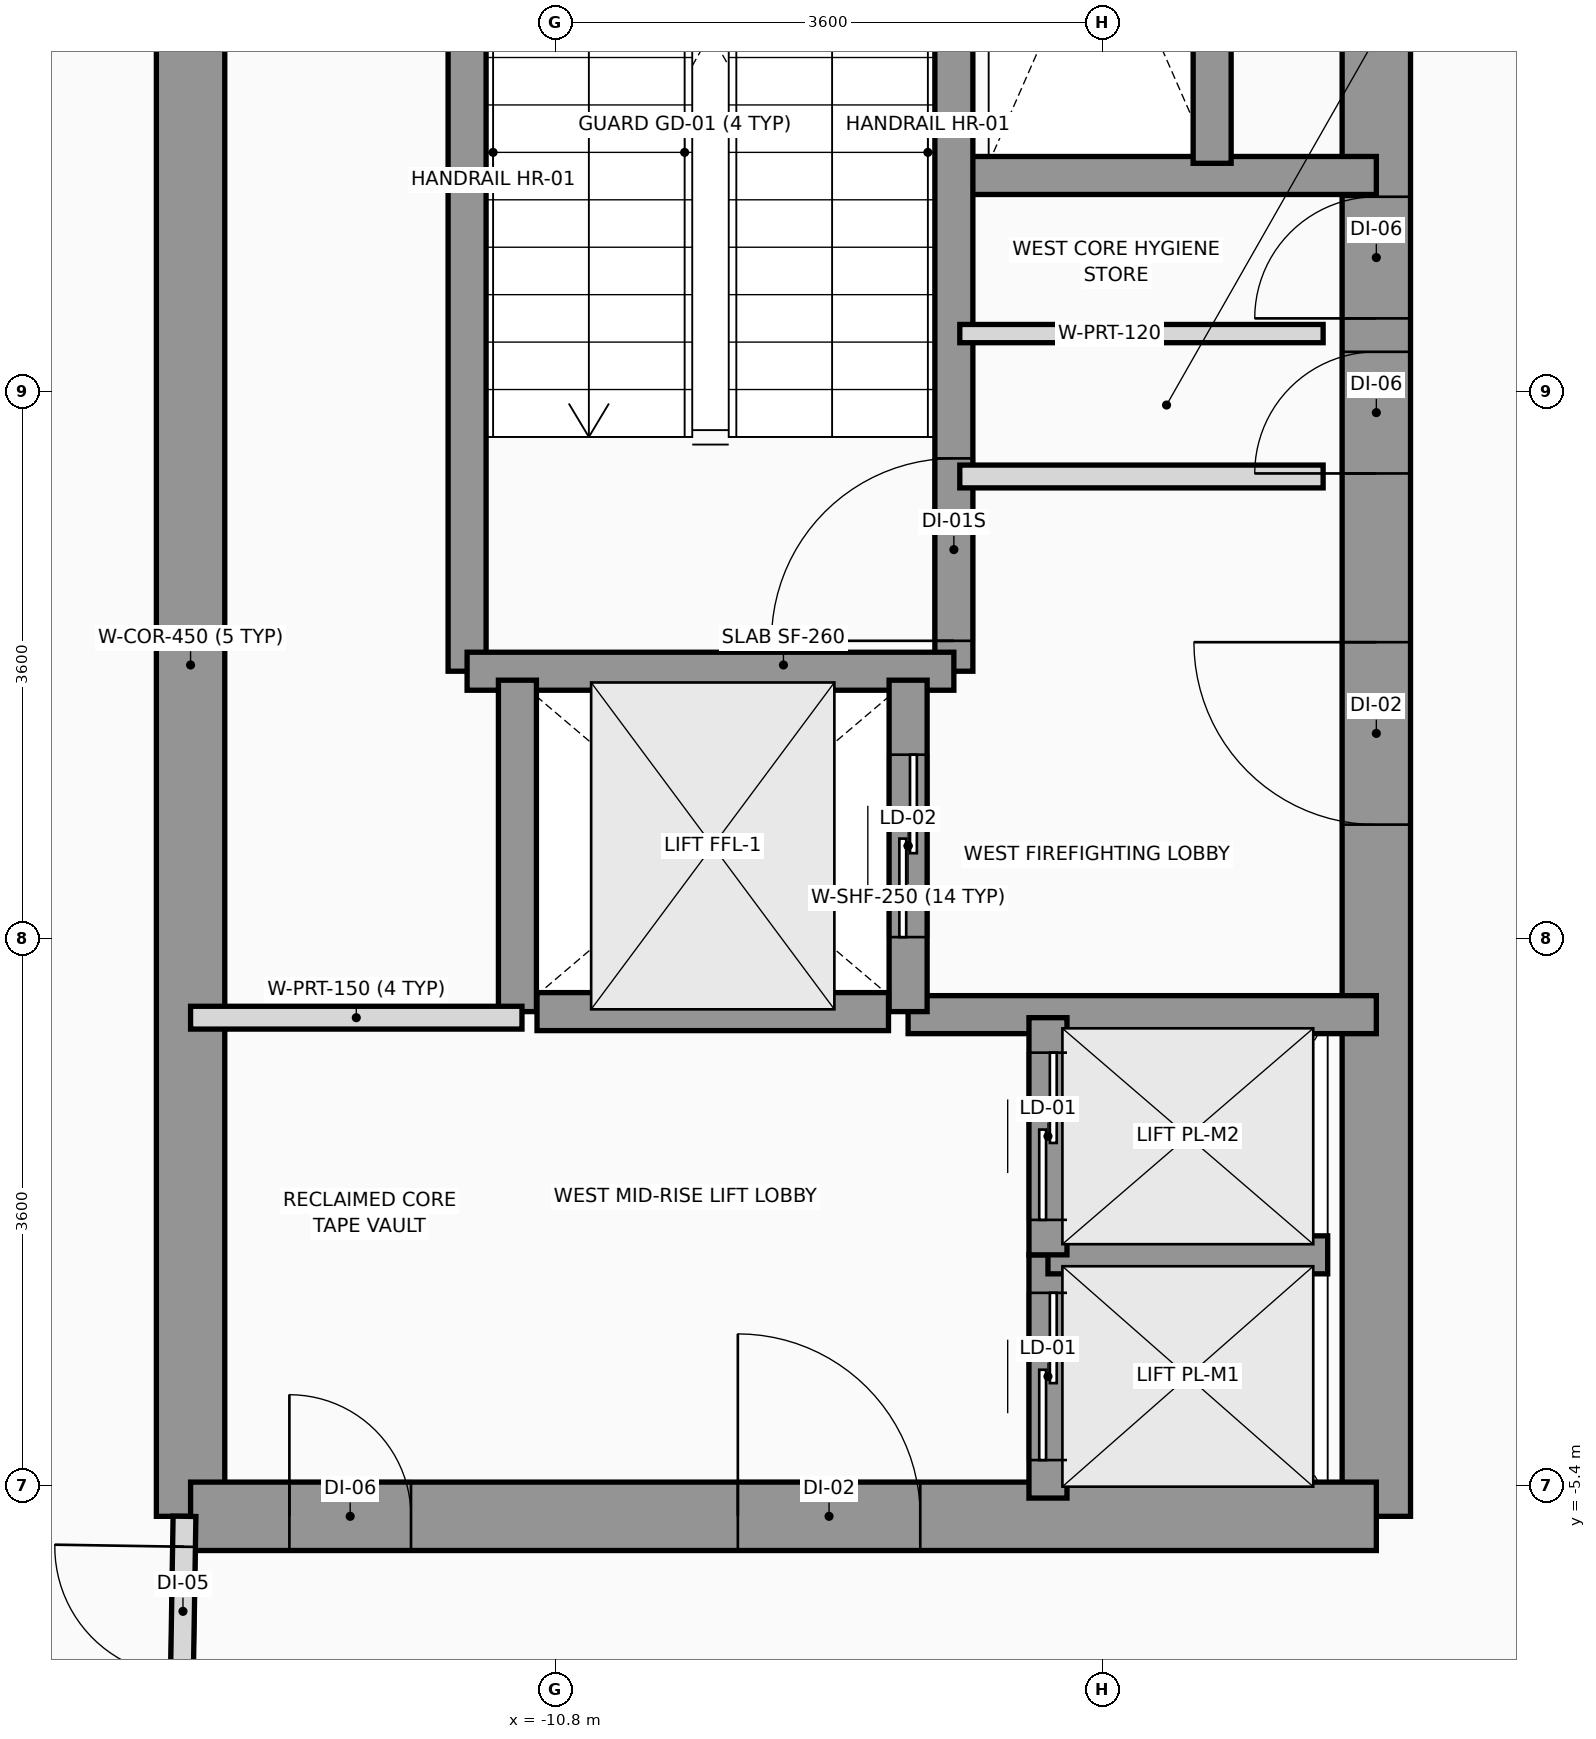
"""IFC4 building model, lengths in metres.
Left out: names, types, materials, properties, quantities, classifications, styles, units other than length and angle.
Written with IfcOpenShell. Run it as: python <this file> out.ifc"""

import sys

from ifc_helpers import new_model, si_unit, direction, frame, frame_2d, origin, place, context, subcontext, project, spatial, rectangle, extrude, source, transform, mapped, element, fill, save


model = new_model("IFC4")
c1 = context("Model", 3, precision=1e-05, world=origin(), true_north=direction((0.0, 1.0)))
c2 = subcontext(c1, "Body", "Model", "MODEL_VIEW")
j1 = project(units=[si_unit("LENGTHUNIT", "METRE"), si_unit("PLANEANGLEUNIT", "RADIAN")], contexts=[c1])
p1 = place(None, origin())
s1 = spatial("IfcSite", under=j1, at=p1, CompositionType="ELEMENT")
p2 = place(p1, origin())
s2 = spatial("IfcBuilding", under=s1, at=p2, CompositionType="ELEMENT")
p3 = place(p2, frame((0.0, 0.0, 151.6)))
s3 = spatial("IfcBuildingStorey", under=s2, at=p3, CompositionType="ELEMENT", Elevation=151.6)
p4 = place(p3, frame((-13.2, -5.6, 0.0), z_axis=(0.0, 0.0, 1.0), x_axis=(0.0, 1.0, 0.0)))
e1 = element("IfcWall", 1, at=p4, inside=s3, PredefinedType="SHEAR", context=c2, shape_type="SweptSolid", body=[
    extrude(rectangle(XDim=11.2, YDim=0.45, at=frame_2d((5.6, 0.0))), origin(), (0.0, 0.0, 1.0), 4.4),
])
p5 = place(p3, frame((-5.4, -5.6, 0.0), z_axis=(0.0, 0.0, 1.0), x_axis=(0.0, 1.0, 0.0)))
e2 = element("IfcWall", 2, at=p5, inside=s3, PredefinedType="SHEAR", context=c2, shape_type="SweptSolid", body=[
    extrude(rectangle(XDim=12.5, YDim=0.45, at=frame_2d((6.25, 0.0))), origin(), (0.0, 0.0, 1.0), 4.4),
])
p6 = place(p5, frame((4.55, 0.0, 0.0)))
e3 = element("IfcOpeningElement", 3, at=p6, cuts=e2, PredefinedType="OPENING", context=c2, shape_type="SweptSolid", body=[
    extrude(rectangle(XDim=1.2, YDim=2.2, at=frame_2d((0.6, 1.1))), frame((0.0, 0.235, 0.0), z_axis=(0.0, -1.0, 0.0), x_axis=(1.0, 0.0, 0.0)), (0.0, 0.0, 1.0), 0.47),
])
p7 = place(p5, frame((6.86, 0.0, 0.0)))
e4 = element("IfcOpeningElement", 4, at=p7, cuts=e2, PredefinedType="OPENING", context=c2, shape_type="SweptSolid", body=[
    extrude(rectangle(XDim=0.8, YDim=2.1, at=frame_2d((0.4, 1.05))), frame((0.0, 0.235, 0.0), z_axis=(0.0, -1.0, 0.0), x_axis=(1.0, 0.0, 0.0)), (0.0, 0.0, 1.0), 0.47),
])
p8 = place(p5, frame((7.88, 0.0, 0.0)))
e5 = element("IfcOpeningElement", 5, at=p8, cuts=e2, PredefinedType="OPENING", context=c2, shape_type="SweptSolid", body=[
    extrude(rectangle(XDim=0.8, YDim=2.1, at=frame_2d((0.4, 1.05))), frame((0.0, 0.235, 0.0), z_axis=(0.0, -1.0, 0.0), x_axis=(1.0, 0.0, 0.0)), (0.0, 0.0, 1.0), 0.47),
])
p9 = place(p3, frame((-13.2, -5.6, 0.0), z_axis=(0.0, 0.0, 1.0), x_axis=(1.0, 0.0, 0.0)))
e6 = element("IfcWall", 6, at=p9, inside=s3, PredefinedType="SHEAR", context=c2, shape_type="SweptSolid", body=[
    extrude(rectangle(XDim=7.8, YDim=0.45, at=frame_2d((3.9, 0.0))), origin(), (0.0, 0.0, 1.0), 4.4),
])
p10 = place(p9, frame((3.6, 0.0, 0.0)))
e7 = element("IfcOpeningElement", 7, at=p10, cuts=e6, PredefinedType="OPENING", context=c2, shape_type="SweptSolid", body=[
    extrude(rectangle(XDim=1.2, YDim=2.2, at=frame_2d((0.6, 1.1))), frame((0.0, 0.235, 0.0), z_axis=(0.0, -1.0, 0.0), x_axis=(1.0, 0.0, 0.0)), (0.0, 0.0, 1.0), 0.47),
])
p11 = place(p9, frame((0.65, 0.0, 0.0)))
e8 = element("IfcOpeningElement", 8, at=p11, cuts=e6, PredefinedType="OPENING", context=c2, shape_type="SweptSolid", body=[
    extrude(rectangle(XDim=0.8, YDim=2.1, at=frame_2d((0.4, 1.05))), frame((0.0, 0.235, 0.0), z_axis=(0.0, -1.0, 0.0), x_axis=(1.0, 0.0, 0.0)), (0.0, 0.0, 1.0), 0.47),
])
p12 = place(p3, frame((-8.18, 3.22, 0.0), z_axis=(0.0, 0.0, 1.0), x_axis=(1.0, 0.0, 0.0)))
e9 = element("IfcWall", 9, at=p12, inside=s3, PredefinedType="SOLIDWALL", context=c2, shape_type="SweptSolid", body=[
    extrude(rectangle(XDim=2.78, YDim=0.25, at=frame_2d((1.39, 0.0))), origin(), (0.0, 0.0, 1.0), 4.4),
])
p13 = place(p3, frame((-8.48, -2.3, 0.0), z_axis=(0.0, 0.0, 1.0), x_axis=(1.0, 0.0, 0.0)))
e10 = element("IfcWall", 10, at=p13, inside=s3, PredefinedType="SOLIDWALL", context=c2, shape_type="SweptSolid", body=[
    extrude(rectangle(XDim=3.08, YDim=0.25, at=frame_2d((1.54, 0.0))), origin(), (0.0, 0.0, 1.0), 4.4),
])
p14 = place(p3, frame((-8.179, -0.041, 0.0), z_axis=(0.0, 0.0, 1.0), x_axis=(0.0, 1.0, 0.0)))
e11 = element("IfcWall", 11, at=p14, inside=s3, PredefinedType="SOLIDWALL", context=c2, shape_type="SweptSolid", body=[
    extrude(rectangle(XDim=6.941, YDim=0.25, at=frame_2d((3.47, 0.0))), origin(), (0.0, 0.0, 1.0), 4.4),
])
p15 = place(p14, frame((0.2, 0.0, 0.0)))
e12 = element("IfcOpeningElement", 12, at=p15, cuts=e11, PredefinedType="OPENING", context=c2, shape_type="SweptSolid", body=[
    extrude(rectangle(XDim=1.2, YDim=2.2, at=frame_2d((0.6, 1.1))), frame((0.0, 0.135, 0.0), z_axis=(0.0, -1.0, 0.0), x_axis=(1.0, 0.0, 0.0)), (0.0, 0.0, 1.0), 0.27),
])
p16 = place(p3, frame((-11.381, -0.041, 0.0), z_axis=(0.0, 0.0, 1.0), x_axis=(0.0, 1.0, 0.0)))
e13 = element("IfcWall", 13, at=p16, inside=s3, PredefinedType="SOLIDWALL", context=c2, shape_type="SweptSolid", body=[
    extrude(rectangle(XDim=6.941, YDim=0.25, at=frame_2d((3.47, 0.0))), origin(), (0.0, 0.0, 1.0), 4.4),
])
p17 = place(p3, frame((-11.381, -0.041, 0.0), z_axis=(0.0, 0.0, 1.0), x_axis=(1.0, 0.0, 0.0)))
e14 = element("IfcWall", 14, at=p17, inside=s3, PredefinedType="SOLIDWALL", context=c2, shape_type="SweptSolid", body=[
    extrude(rectangle(XDim=3.202, YDim=0.25, at=frame_2d((1.601, 0.0))), origin(), (0.0, 0.0, 1.0), 4.4),
])
p18 = place(p3, frame((-11.05, -2.28, 0.0), z_axis=(0.0, 0.0, 1.0), x_axis=(0.0, 1.0, 0.0)))
e15 = element("IfcWall", 15, at=p18, inside=s3, PredefinedType="SOLIDWALL", context=c2, shape_type="SweptSolid", body=[
    extrude(rectangle(XDim=2.18, YDim=0.25, at=frame_2d((1.09, 0.0))), origin(), (0.0, 0.0, 1.0), 4.4),
])
p19 = place(p3, frame((-8.48, -2.28, 0.0), z_axis=(0.0, 0.0, 1.0), x_axis=(0.0, 1.0, 0.0)))
e16 = element("IfcWall", 16, at=p19, inside=s3, PredefinedType="SOLIDWALL", context=c2, shape_type="SweptSolid", body=[
    extrude(rectangle(XDim=2.18, YDim=0.25, at=frame_2d((1.09, 0.0))), origin(), (0.0, 0.0, 1.0), 4.4),
])
p20 = place(p19, frame((0.49, 0.0, 0.0)))
e17 = element("IfcOpeningElement", 17, at=p20, cuts=e16, PredefinedType="OPENING", context=c2, shape_type="SweptSolid", body=[
    extrude(rectangle(XDim=1.2, YDim=2.2, at=frame_2d((0.6, 1.1))), frame((0.0, 0.135, 0.0), z_axis=(0.0, -1.0, 0.0), x_axis=(1.0, 0.0, 0.0)), (0.0, 0.0, 1.0), 0.27),
])
p21 = place(p3, frame((-10.921, -2.28, 0.0), z_axis=(0.0, 0.0, 1.0), x_axis=(1.0, 0.0, 0.0)))
e18 = element("IfcWall", 18, at=p21, inside=s3, PredefinedType="SOLIDWALL", context=c2, shape_type="SweptSolid", body=[
    extrude(rectangle(XDim=2.312, YDim=0.25, at=frame_2d((1.156, 0.0))), origin(), (0.0, 0.0, 1.0), 4.4),
])
p22 = place(p3, frame((-7.56, -5.48, 0.0), z_axis=(0.0, 0.0, 1.0), x_axis=(0.0, 1.0, 0.0)))
e19 = element("IfcWall", 19, at=p22, inside=s3, PredefinedType="SOLIDWALL", context=c2, shape_type="SweptSolid", body=[
    extrude(rectangle(XDim=1.6, YDim=0.25, at=frame_2d((0.8, 0.0))), origin(), (0.0, 0.0, 1.0), 4.4),
])
p23 = place(p22, frame((0.25, 0.0, 0.0)))
e20 = element("IfcOpeningElement", 20, at=p23, cuts=e19, PredefinedType="OPENING", context=c2, shape_type="SweptSolid", body=[
    extrude(rectangle(XDim=1.1, YDim=2.2, at=frame_2d((0.55, 1.1))), frame((0.0, 0.135, 0.0), z_axis=(0.0, -1.0, 0.0), x_axis=(1.0, 0.0, 0.0)), (0.0, 0.0, 1.0), 0.27),
])
p24 = place(p3, frame((-7.56, -3.88, 0.0), z_axis=(0.0, 0.0, 1.0), x_axis=(1.0, 0.0, 0.0)))
e21 = element("IfcWall", 21, at=p24, inside=s3, PredefinedType="SOLIDWALL", context=c2, shape_type="SweptSolid", body=[
    extrude(rectangle(XDim=1.84, YDim=0.25, at=frame_2d((0.92, 0.0))), origin(), (0.0, 0.0, 1.0), 4.4),
])
p25 = place(p3, frame((-7.56, -3.88, 0.0), z_axis=(0.0, 0.0, 1.0), x_axis=(0.0, 1.0, 0.0)))
e22 = element("IfcWall", 22, at=p25, inside=s3, PredefinedType="SOLIDWALL", context=c2, shape_type="SweptSolid", body=[
    extrude(rectangle(XDim=1.56, YDim=0.25, at=frame_2d((0.78, 0.0))), origin(), (0.0, 0.0, 1.0), 4.4),
])
p26 = place(p25, frame((0.23, 0.0, 0.0)))
e23 = element("IfcOpeningElement", 23, at=p26, cuts=e22, PredefinedType="OPENING", context=c2, shape_type="SweptSolid", body=[
    extrude(rectangle(XDim=1.1, YDim=2.2, at=frame_2d((0.55, 1.1))), frame((0.0, 0.135, 0.0), z_axis=(0.0, -1.0, 0.0), x_axis=(1.0, 0.0, 0.0)), (0.0, 0.0, 1.0), 0.27),
])
p27 = place(p3, frame((-6.48, 3.3, 0.0), z_axis=(0.0, 0.0, 1.0), x_axis=(0.0, 1.0, 0.0)))
e24 = element("IfcWall", 24, at=p27, inside=s3, PredefinedType="SOLIDWALL", context=c2, shape_type="SweptSolid", body=[
    extrude(rectangle(XDim=1.68, YDim=0.25, at=frame_2d((0.84, 0.0))), origin(), (0.0, 0.0, 1.0), 4.4),
])
p28 = place(p3, frame((-8.14, 1.24, 0.0), z_axis=(0.0, 0.0, 1.0), x_axis=(1.0, 0.0, 0.0)))
e25 = element("IfcWall", 25, at=p28, inside=s3, PredefinedType="PARTITIONING", context=c2, shape_type="SweptSolid", body=[
    extrude(rectangle(XDim=2.39, YDim=0.15, at=frame_2d((1.195, 0.0))), origin(), (0.0, 0.0, 1.0), 3.5),
])
p29 = place(p3, frame((-8.14, 2.18, 0.0), z_axis=(0.0, 0.0, 1.0), x_axis=(1.0, 0.0, 0.0)))
e26 = element("IfcWall", 26, at=p29, inside=s3, PredefinedType="PARTITIONING", context=c2, shape_type="SweptSolid", body=[
    extrude(rectangle(XDim=2.39, YDim=0.12, at=frame_2d((1.195, 0.0))), origin(), (0.0, 0.0, 1.0), 3.5),
])
p30 = place(p3, frame((-13.2, -2.32, 0.0), z_axis=(0.0, 0.0, 1.0), x_axis=(1.0, 0.0, 0.0)))
e27 = element("IfcWall", 27, at=p30, inside=s3, PredefinedType="PARTITIONING", context=c2, shape_type="SweptSolid", body=[
    extrude(rectangle(XDim=2.18, YDim=0.15, at=frame_2d((1.09, 0.0))), origin(), (0.0, 0.0, 1.0), 4.4),
])
p31 = place(p3, frame((-13.26, -6.85, 0.0), z_axis=(0.0, 0.0, 1.0), x_axis=(0.016013571389, 0.999871774545, 0.0)))
e28 = element("IfcWall", 28, at=p31, inside=s3, PredefinedType="PARTITIONING", context=c2, shape_type="SweptSolid", body=[
    extrude(rectangle(XDim=1.25, YDim=0.15, at=frame_2d((0.625, 0.0))), origin(), (0.0, 0.0, 1.0), 4.4),
])
p32 = place(p31, frame((0.2, 0.0, 0.0)))
e29 = element("IfcOpeningElement", 29, at=p32, cuts=e28, PredefinedType="OPENING", context=c2, shape_type="SweptSolid", body=[
    extrude(rectangle(XDim=0.85, YDim=2.1, at=frame_2d((0.425, 1.05))), frame((0.0, 0.085, 0.0), z_axis=(0.0, -1.0, 0.0), x_axis=(1.0, 0.0, 0.0)), (0.0, 0.0, 1.0), 0.17),
])
m1 = source(origin(), c2, "Body", "SweptSolid", [
    extrude(rectangle(XDim=1.2, YDim=2.2, at=frame_2d((0.6, 1.1))), frame((0.0, 0.025, 0.0), z_axis=(0.0, -1.0, 0.0), x_axis=(1.0, 0.0, 0.0)), (0.0, 0.0, 1.0), 0.05),
])
p33 = place(p15, origin())
e30 = element("IfcDoor", 30, at=p33, inside=s3, OperationType="SINGLE_SWING_LEFT", PredefinedType="DOOR", context=c2, shape_type="MappedRepresentation", body=[
    mapped(m1, transform((0.0, 0.0, 0.0), x_axis=(1.0, 0.0, 0.0), y_axis=(0.0, 1.0, 0.0), z_axis=(0.0, 0.0, 1.0), scale=1.0)),
])
fill(e12, e30)
p34 = place(p6, origin())
e31 = element("IfcDoor", 31, at=p34, inside=s3, OperationType="SINGLE_SWING_RIGHT", PredefinedType="DOOR", context=c2, shape_type="MappedRepresentation", body=[
    mapped(m1, transform((0.0, 0.0, 0.0), x_axis=(1.0, 0.0, 0.0), y_axis=(0.0, 1.0, 0.0), z_axis=(0.0, 0.0, 1.0), scale=1.0)),
])
fill(e3, e31)
p35 = place(p10, origin())
e32 = element("IfcDoor", 32, at=p35, inside=s3, OperationType="SINGLE_SWING_LEFT", PredefinedType="DOOR", context=c2, shape_type="MappedRepresentation", body=[
    mapped(m1, transform((0.0, 0.0, 0.0), x_axis=(1.0, 0.0, 0.0), y_axis=(0.0, 1.0, 0.0), z_axis=(0.0, 0.0, 1.0), scale=1.0)),
])
fill(e7, e32)
m2 = source(origin(), c2, "Body", "SweptSolid", [
    extrude(rectangle(XDim=0.8, YDim=2.1, at=frame_2d((0.4, 1.05))), frame((0.0, 0.025, 0.0), z_axis=(0.0, -1.0, 0.0), x_axis=(1.0, 0.0, 0.0)), (0.0, 0.0, 1.0), 0.05),
])
p36 = place(p7, origin())
e33 = element("IfcDoor", 33, at=p36, inside=s3, OperationType="SINGLE_SWING_LEFT", PredefinedType="DOOR", context=c2, shape_type="MappedRepresentation", body=[
    mapped(m2, transform((0.0, 0.0, 0.0), x_axis=(1.0, 0.0, 0.0), y_axis=(0.0, 1.0, 0.0), z_axis=(0.0, 0.0, 1.0), scale=1.0)),
])
fill(e4, e33)
p37 = place(p8, origin())
e34 = element("IfcDoor", 34, at=p37, inside=s3, OperationType="SINGLE_SWING_LEFT", PredefinedType="DOOR", context=c2, shape_type="MappedRepresentation", body=[
    mapped(m2, transform((0.0, 0.0, 0.0), x_axis=(1.0, 0.0, 0.0), y_axis=(0.0, 1.0, 0.0), z_axis=(0.0, 0.0, 1.0), scale=1.0)),
])
fill(e5, e34)
p38 = place(p11, origin())
e35 = element("IfcDoor", 35, at=p38, inside=s3, OperationType="SINGLE_SWING_LEFT", PredefinedType="DOOR", context=c2, shape_type="MappedRepresentation", body=[
    mapped(m2, transform((0.0, 0.0, 0.0), x_axis=(1.0, 0.0, 0.0), y_axis=(0.0, 1.0, 0.0), z_axis=(0.0, 0.0, 1.0), scale=1.0)),
])
fill(e8, e35)
p39 = place(p20, origin())
e36 = element("IfcDoor", 36, at=p39, inside=s3, OperationType="SLIDING_TO_RIGHT", PredefinedType="DOOR", context=c2, shape_type="MappedRepresentation", body=[
    mapped(m1, transform((0.0, 0.0, 0.0), x_axis=(1.0, 0.0, 0.0), y_axis=(0.0, 1.0, 0.0), z_axis=(0.0, 0.0, 1.0), scale=1.0)),
])
fill(e17, e36)
m3 = source(origin(), c2, "Body", "SweptSolid", [
    extrude(rectangle(XDim=1.1, YDim=2.2, at=frame_2d((0.55, 1.1))), frame((0.0, 0.025, 0.0), z_axis=(0.0, -1.0, 0.0), x_axis=(1.0, 0.0, 0.0)), (0.0, 0.0, 1.0), 0.05),
])
p40 = place(p23, origin())
e37 = element("IfcDoor", 37, at=p40, inside=s3, OperationType="SLIDING_TO_LEFT", PredefinedType="DOOR", context=c2, shape_type="MappedRepresentation", body=[
    mapped(m3, transform((0.0, 0.0, 0.0), x_axis=(1.0, 0.0, 0.0), y_axis=(0.0, 1.0, 0.0), z_axis=(0.0, 0.0, 1.0), scale=1.0)),
])
fill(e20, e37)
p41 = place(p26, origin())
e38 = element("IfcDoor", 38, at=p41, inside=s3, OperationType="SLIDING_TO_LEFT", PredefinedType="DOOR", context=c2, shape_type="MappedRepresentation", body=[
    mapped(m3, transform((0.0, 0.0, 0.0), x_axis=(1.0, 0.0, 0.0), y_axis=(0.0, 1.0, 0.0), z_axis=(0.0, 0.0, 1.0), scale=1.0)),
])
fill(e23, e38)
m4 = source(origin(), c2, "Body", "SweptSolid", [
    extrude(rectangle(XDim=0.85, YDim=2.1, at=frame_2d((0.425, 1.05))), frame((0.0, 0.025, 0.0), z_axis=(0.0, -1.0, 0.0), x_axis=(1.0, 0.0, 0.0)), (0.0, 0.0, 1.0), 0.05),
])
p42 = place(p32, origin())
e39 = element("IfcDoor", 39, at=p42, inside=s3, OperationType="SINGLE_SWING_RIGHT", PredefinedType="DOOR", context=c2, shape_type="MappedRepresentation", body=[
    mapped(m4, transform((0.0, 0.0, 0.0), x_axis=(1.0, 0.0, 0.0), y_axis=(0.0, 1.0, 0.0), z_axis=(0.0, 0.0, 1.0), scale=1.0)),
])
fill(e29, e39)
save(model, sys.argv[1])
